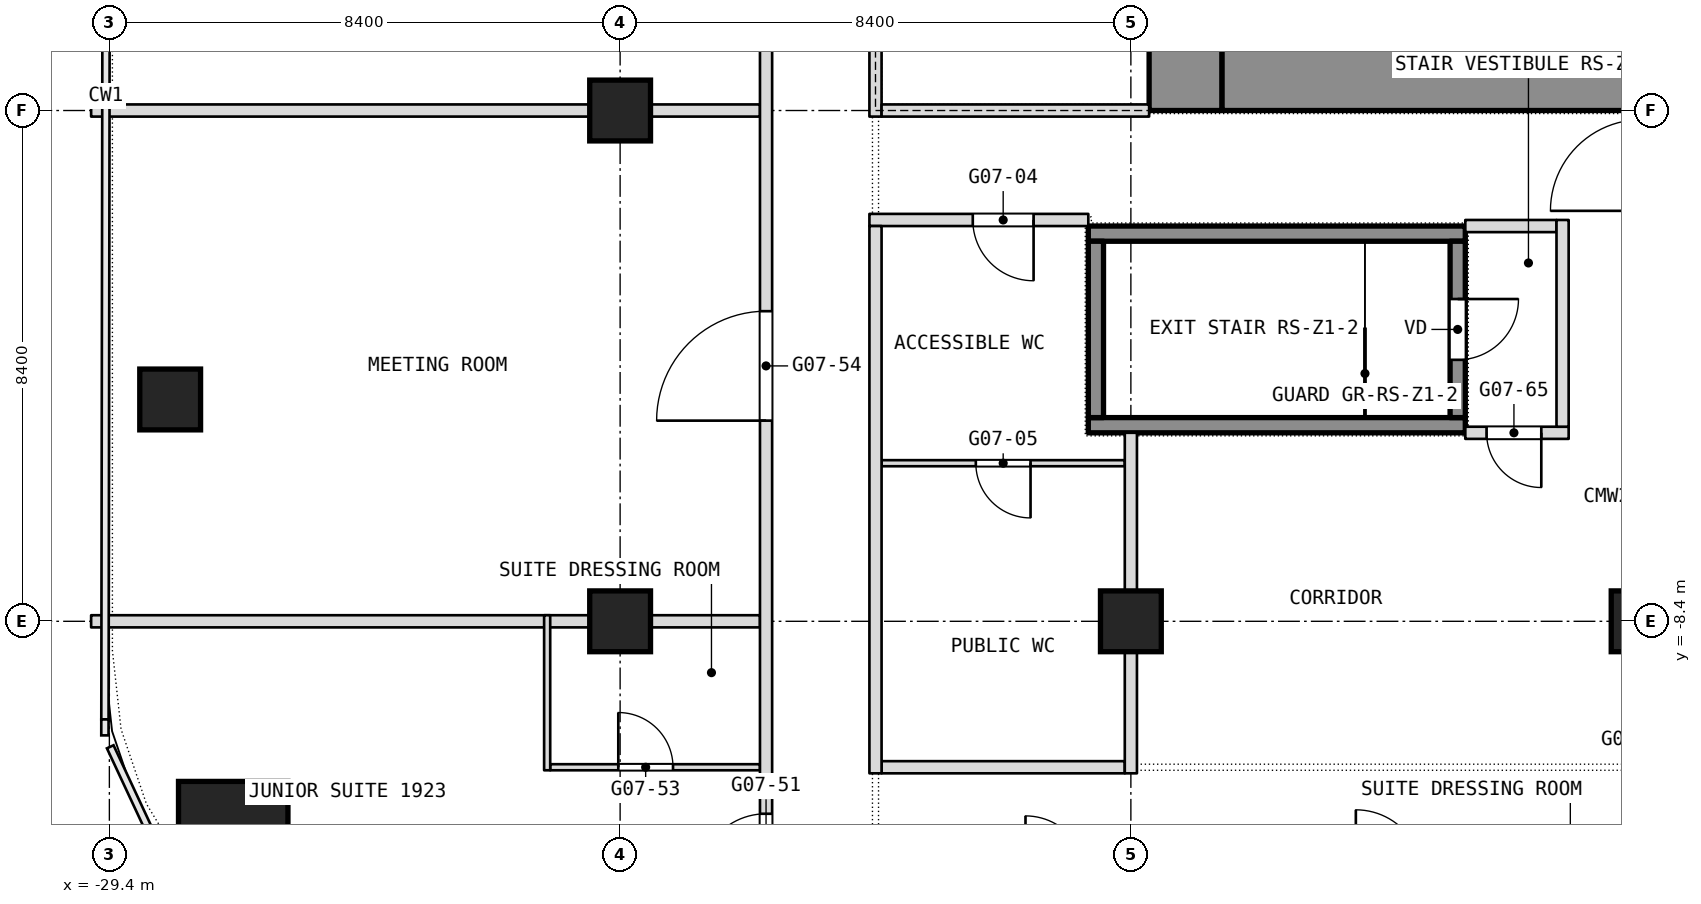
"""IFC4 building model, lengths in metres.
Left out: names, types, materials, properties, quantities, classifications, styles, units other than length and angle.
Written with IfcOpenShell. Run it as: python <this file> out.ifc"""

import sys

from ifc_helpers import new_model, si_unit, direction, frame, frame_2d, origin, origin_2d, place, context, subcontext, project, spatial, rectangle, extrude, element, fill, save


model = new_model("IFC4")
c1 = context("Model", 3, precision=1e-05, world=origin(), true_north=direction((0.0, 1.0)))
c2 = subcontext(c1, "Body", "Model", "MODEL_VIEW")
j1 = project(units=[si_unit("LENGTHUNIT", "METRE"), si_unit("PLANEANGLEUNIT", "RADIAN")], contexts=[c1])
p1 = place(None, origin())
s1 = spatial("IfcSite", under=j1, at=p1, CompositionType="ELEMENT")
p2 = place(p1, origin())
s2 = spatial("IfcBuilding", under=s1, at=p2, CompositionType="ELEMENT")
p3 = place(p2, frame((0.0, 0.0, 83.3)))
s3 = spatial("IfcBuildingStorey", under=s2, at=p3, CompositionType="ELEMENT", Elevation=83.3)
p4 = place(p3, frame((-11.7, 0.0, 0.0), z_axis=(0.0, 0.0, 1.0), x_axis=(0.0, 1.0, 0.0)))
e1 = element("IfcWall", 1, at=p4, inside=s3, PredefinedType="SHEAR", context=c2, shape_type="SweptSolid", body=[
    extrude(rectangle(XDim=16.8, YDim=1.2, at=frame_2d((8.4, 0.0))), origin(), (0.0, 0.0, 1.0), 3.6),
])
p5 = place(p4, frame((2.3, 0.0, 0.0)))
e2 = element("IfcOpeningElement", 2, at=p5, cuts=e1, PredefinedType="OPENING", context=c2, shape_type="SweptSolid", body=[
    extrude(rectangle(XDim=1.1, YDim=2.1, at=frame_2d((0.55, 1.05))), frame((0.0, 0.6, 0.0), z_axis=(0.0, -1.0, 0.0), x_axis=(1.0, 0.0, 0.0)), (0.0, 0.0, 1.0), 1.2),
])
p6 = place(p4, frame((4.85, 0.0, 0.0)))
e3 = element("IfcOpeningElement", 3, at=p6, cuts=e1, PredefinedType="OPENING", context=c2, shape_type="SweptSolid", body=[
    extrude(rectangle(XDim=1.1, YDim=2.1, at=frame_2d((0.55, 1.05))), frame((0.0, 0.6, 0.0), z_axis=(0.0, -1.0, 0.0), x_axis=(1.0, 0.0, 0.0)), (0.0, 0.0, 1.0), 1.2),
])
p7 = place(p4, frame((6.825, 0.0, 0.0)))
e4 = element("IfcOpeningElement", 4, at=p7, cuts=e1, PredefinedType="OPENING", context=c2, shape_type="SweptSolid", body=[
    extrude(rectangle(XDim=1.2, YDim=2.1, at=frame_2d((0.6, 1.05))), frame((0.0, 0.6, 0.0), z_axis=(0.0, -1.0, 0.0), x_axis=(1.0, 0.0, 0.0)), (0.0, 0.0, 1.0), 1.2),
])
p8 = place(p4, frame((13.4, 0.0, 0.0)))
e5 = element("IfcOpeningElement", 5, at=p8, cuts=e1, PredefinedType="OPENING", context=c2, shape_type="SweptSolid", body=[
    extrude(rectangle(XDim=1.1, YDim=2.1, at=frame_2d((0.55, 1.05))), frame((0.0, 0.6, 0.0), z_axis=(0.0, -1.0, 0.0), x_axis=(1.0, 0.0, 0.0)), (0.0, 0.0, 1.0), 1.2),
])
p9 = place(p4, frame((10.85, 0.0, 0.0)))
e6 = element("IfcOpeningElement", 6, at=p9, cuts=e1, PredefinedType="OPENING", context=c2, shape_type="SweptSolid", body=[
    extrude(rectangle(XDim=1.1, YDim=2.1, at=frame_2d((0.55, 1.05))), frame((0.0, 0.6, 0.0), z_axis=(0.0, -1.0, 0.0), x_axis=(1.0, 0.0, 0.0)), (0.0, 0.0, 1.0), 1.2),
])
p10 = place(p4, frame((8.775, 0.0, 0.0)))
e7 = element("IfcOpeningElement", 7, at=p10, cuts=e1, PredefinedType="OPENING", context=c2, shape_type="SweptSolid", body=[
    extrude(rectangle(XDim=1.2, YDim=2.1, at=frame_2d((0.6, 1.05))), frame((0.0, 0.6, 0.0), z_axis=(0.0, -1.0, 0.0), x_axis=(1.0, 0.0, 0.0)), (0.0, 0.0, 1.0), 1.2),
])
p11 = place(p3, frame((-11.1, 0.6, 0.0), z_axis=(0.0, 0.0, 1.0), x_axis=(1.0, 0.0, 0.0)))
e8 = element("IfcWall", 8, at=p11, inside=s3, PredefinedType="SHEAR", context=c2, shape_type="SweptSolid", body=[
    extrude(rectangle(XDim=22.2, YDim=1.2, at=frame_2d((11.1, 0.0))), origin(), (0.0, 0.0, 1.0), 3.6),
])
p12 = place(p3, frame((-27.363, -11.933, 0.0), z_axis=(0.0, 0.0, 1.0), x_axis=(1.0, 0.0, 0.0)))
e9 = element("IfcColumn", 9, at=p12, inside=s3, PredefinedType="COLUMN", context=c2, shape_type="SweptSolid", body=[
    extrude(rectangle(XDim=1.8, YDim=1.8, at=origin_2d()), origin(), (0.0, 0.0, 1.0), 3.6),
])
for number, where, z_axis, x_axis in (
    (10, (-21.0, -8.4, 0.0), (0.0, 0.0, 1.0), (1.0, 0.0, 0.0)),
    (11, (-21.0, 0.0, 0.0), (0.0, 0.0, 1.0), (1.0, 0.0, 0.0)),
    (12, (-12.6, -8.4, 0.0), (0.0, 0.0, 1.0), (1.0, 0.0, 0.0)),
    (13, (-4.2, -8.4, 0.0), (0.0, 0.0, 1.0), (1.0, 0.0, 0.0)),
    (14, (-28.4, -4.752, 0.0), (0.0, 0.0, 1.0), (1.0, 0.0, 0.0)),
):
    element("IfcColumn", number, at=place(p3, frame(where, z_axis=z_axis, x_axis=x_axis)), inside=s3, PredefinedType="COLUMN", context=c2, shape_type="SweptSolid", body=[
        extrude(rectangle(XDim=1.0, YDim=1.0, at=origin_2d()), origin(), (0.0, 0.0, 1.0), 3.6),
    ])
p13 = place(p3, frame((-22.15, -10.8, 0.0), z_axis=(0.0, 0.0, 1.0), x_axis=(1.0, 0.0, 0.0)))
e15 = element("IfcWall", 15, at=p13, inside=s3, PredefinedType="PARTITIONING", context=c2, shape_type="SweptSolid", body=[
    extrude(rectangle(XDim=3.45, YDim=0.1, at=frame_2d((1.725, 0.0))), origin(), (0.0, 0.0, 1.0), 3.3),
])
p14 = place(p13, frame((1.12, 0.0, 0.0)))
e16 = element("IfcOpeningElement", 16, at=p14, cuts=e15, PredefinedType="OPENING", context=c2, shape_type="SweptSolid", body=[
    extrude(rectangle(XDim=0.9, YDim=2.1, at=frame_2d((0.45, 1.05))), frame((0.0, 0.05, 0.0), z_axis=(0.0, -1.0, 0.0), x_axis=(1.0, 0.0, 0.0)), (0.0, 0.0, 1.0), 0.1),
])
p15 = place(p3, frame((-16.7, -10.8, 0.0), z_axis=(0.0, 0.0, 1.0), x_axis=(1.0, 0.0, 0.0)))
e17 = element("IfcWall", 17, at=p15, inside=s3, PredefinedType="PARTITIONING", context=c2, shape_type="SweptSolid", body=[
    extrude(rectangle(XDim=4.0, YDim=0.2, at=frame_2d((2.0, 0.0))), origin(), (0.0, 0.0, 1.0), 3.3),
])
p16 = place(p3, frame((-29.7, -8.4, 0.0), z_axis=(0.0, 0.0, 1.0), x_axis=(1.0, 0.0, 0.0)))
e18 = element("IfcWall", 18, at=p16, inside=s3, PredefinedType="PARTITIONING", context=c2, shape_type="SweptSolid", body=[
    extrude(rectangle(XDim=11.0, YDim=0.2, at=frame_2d((5.5, 0.0))), origin(), (0.0, 0.0, 1.0), 2.8),
])
p17 = place(p3, frame((-16.7, -5.8, 0.0), z_axis=(0.0, 0.0, 1.0), x_axis=(1.0, 0.0, 0.0)))
e19 = element("IfcWall", 19, at=p17, inside=s3, PredefinedType="PARTITIONING", context=c2, shape_type="SweptSolid", body=[
    extrude(rectangle(XDim=4.0, YDim=0.1, at=frame_2d((2.0, 0.0))), origin(), (0.0, 0.0, 1.0), 3.3),
])
p18 = place(p17, frame((1.55, 0.0, 0.0)))
e20 = element("IfcOpeningElement", 20, at=p18, cuts=e19, PredefinedType="OPENING", context=c2, shape_type="SweptSolid", body=[
    extrude(rectangle(XDim=0.9, YDim=2.1, at=frame_2d((0.45, 1.05))), frame((0.0, 0.05, 0.0), z_axis=(0.0, -1.0, 0.0), x_axis=(1.0, 0.0, 0.0)), (0.0, 0.0, 1.0), 0.1),
])
p19 = place(p3, frame((-7.1, -5.3, 0.0), z_axis=(0.0, 0.0, 1.0), x_axis=(1.0, 0.0, 0.0)))
e21 = element("IfcWall", 21, at=p19, inside=s3, PredefinedType="PARTITIONING", context=c2, shape_type="SweptSolid", body=[
    extrude(rectangle(XDim=1.7, YDim=0.2, at=frame_2d((0.85, 0.0))), origin(), (0.0, 0.0, 1.0), 3.3),
])
p20 = place(p19, frame((0.35, 0.0, 0.0)))
e22 = element("IfcOpeningElement", 22, at=p20, cuts=e21, PredefinedType="OPENING", context=c2, shape_type="SweptSolid", body=[
    extrude(rectangle(XDim=0.9, YDim=2.1, at=frame_2d((0.45, 1.05))), frame((0.0, 0.1, 0.0), z_axis=(0.0, -1.0, 0.0), x_axis=(1.0, 0.0, 0.0)), (0.0, 0.0, 1.0), 0.2),
])
p21 = place(p3, frame((-7.1, -1.9, 0.0), z_axis=(0.0, 0.0, 1.0), x_axis=(1.0, 0.0, 0.0)))
e23 = element("IfcWall", 23, at=p21, inside=s3, PredefinedType="PARTITIONING", context=c2, shape_type="SweptSolid", body=[
    extrude(rectangle(XDim=1.5, YDim=0.2, at=frame_2d((0.75, 0.0))), origin(), (0.0, 0.0, 1.0), 3.3),
])
p22 = place(p3, frame((-16.9, -1.8, 0.0), z_axis=(0.0, 0.0, 1.0), x_axis=(1.0, 0.0, 0.0)))
e24 = element("IfcWall", 24, at=p22, inside=s3, PredefinedType="PARTITIONING", context=c2, shape_type="SweptSolid", body=[
    extrude(rectangle(XDim=3.6, YDim=0.2, at=frame_2d((1.8, 0.0))), origin(), (0.0, 0.0, 1.0), 3.3),
])
p23 = place(p22, frame((1.7, 0.0, 0.0)))
e25 = element("IfcOpeningElement", 25, at=p23, cuts=e24, PredefinedType="OPENING", context=c2, shape_type="SweptSolid", body=[
    extrude(rectangle(XDim=1.0, YDim=2.1, at=frame_2d((0.5, 1.05))), frame((0.0, 0.1, 0.0), z_axis=(0.0, -1.0, 0.0), x_axis=(1.0, 0.0, 0.0)), (0.0, 0.0, 1.0), 0.2),
])
p24 = place(p3, frame((-29.7, 0.0, 0.0), z_axis=(0.0, 0.0, 1.0), x_axis=(1.0, 0.0, 0.0)))
e26 = element("IfcWall", 26, at=p24, inside=s3, PredefinedType="PARTITIONING", context=c2, shape_type="SweptSolid", body=[
    extrude(rectangle(XDim=11.0, YDim=0.2, at=frame_2d((5.5, 0.0))), origin(), (0.0, 0.0, 1.0), 2.8),
])
p25 = place(p3, frame((-5.5, -5.2, 0.0), z_axis=(0.0, 0.0, 1.0), x_axis=(0.0, 1.0, 0.0)))
e27 = element("IfcWall", 27, at=p25, inside=s3, PredefinedType="PARTITIONING", context=c2, shape_type="SweptSolid", body=[
    extrude(rectangle(XDim=3.4, YDim=0.2, at=frame_2d((1.7, 0.0))), origin(), (0.0, 0.0, 1.0), 3.3),
])
p26 = place(p3, frame((-12.6, -10.9, 0.0), z_axis=(0.0, 0.0, 1.0), x_axis=(0.0, 1.0, 0.0)))
e28 = element("IfcWall", 28, at=p26, inside=s3, PredefinedType="PARTITIONING", context=c2, shape_type="SweptSolid", body=[
    extrude(rectangle(XDim=5.6, YDim=0.2, at=frame_2d((2.8, 0.0))), origin(), (0.0, 0.0, 1.0), 2.486),
])
p27 = place(p3, frame((-16.8, -10.9, 0.0), z_axis=(0.0, 0.0, 1.0), x_axis=(0.0, 1.0, 0.0)))
e29 = element("IfcWall", 29, at=p27, inside=s3, PredefinedType="PARTITIONING", context=c2, shape_type="SweptSolid", body=[
    extrude(rectangle(XDim=9.0, YDim=0.2, at=frame_2d((4.5, 0.0))), origin(), (0.0, 0.0, 1.0), 3.3),
])
p28 = place(p3, frame((-18.6, -16.665, 0.0), z_axis=(0.0, 0.0, 1.0), x_axis=(0.0, 1.0, 0.0)))
e30 = element("IfcWall", 30, at=p28, inside=s3, PredefinedType="PARTITIONING", context=c2, shape_type="SweptSolid", body=[
    extrude(rectangle(XDim=23.565, YDim=0.2, at=frame_2d((11.782, 0.0))), origin(), (0.0, 0.0, 1.0), 3.3),
])
p29 = place(p28, frame((4.0, 0.0, 0.0)))
e31 = element("IfcOpeningElement", 31, at=p29, cuts=e30, PredefinedType="OPENING", context=c2, shape_type="SweptSolid", body=[
    extrude(rectangle(XDim=1.1, YDim=2.1, at=frame_2d((0.55, 1.05))), frame((0.0, 0.1, 0.0), z_axis=(0.0, -1.0, 0.0), x_axis=(1.0, 0.0, 0.0)), (0.0, 0.0, 1.0), 0.2),
])
p30 = place(p28, frame((11.565, 0.0, 0.0)))
e32 = element("IfcOpeningElement", 32, at=p30, cuts=e30, PredefinedType="OPENING", context=c2, shape_type="SweptSolid", body=[
    extrude(rectangle(XDim=1.8, YDim=2.1, at=frame_2d((0.9, 1.05))), frame((0.0, 0.1, 0.0), z_axis=(0.0, -1.0, 0.0), x_axis=(1.0, 0.0, 0.0)), (0.0, 0.0, 1.0), 0.2),
])
p31 = place(p28, frame((19.965, 0.0, 0.0)))
e33 = element("IfcOpeningElement", 33, at=p31, cuts=e30, PredefinedType="OPENING", context=c2, shape_type="SweptSolid", body=[
    extrude(rectangle(XDim=1.8, YDim=2.1, at=frame_2d((0.9, 1.05))), frame((0.0, 0.1, 0.0), z_axis=(0.0, -1.0, 0.0), x_axis=(1.0, 0.0, 0.0)), (0.0, 0.0, 1.0), 0.2),
])
p32 = place(p3, frame((-22.2, -10.85, 0.0), z_axis=(0.0, 0.0, 1.0), x_axis=(0.0, 1.0, 0.0)))
e34 = element("IfcWall", 34, at=p32, inside=s3, PredefinedType="PARTITIONING", context=c2, shape_type="SweptSolid", body=[
    extrude(rectangle(XDim=2.55, YDim=0.1, at=frame_2d((1.275, 0.0))), origin(), (0.0, 0.0, 1.0), 3.3),
])
p33 = place(p3, frame((-16.8, -0.1, 0.0), z_axis=(0.0, 0.0, 1.0), x_axis=(0.0, 1.0, 0.0)))
e35 = element("IfcWall", 35, at=p33, inside=s3, PredefinedType="PARTITIONING", context=c2, shape_type="SweptSolid", body=[
    extrude(rectangle(XDim=17.0, YDim=0.2, at=frame_2d((8.5, 0.0))), origin(), (0.0, 0.0, 1.0), 3.3),
])
p34 = place(p33, frame((2.2, 0.0, 0.0)))
e36 = element("IfcOpeningElement", 36, at=p34, cuts=e35, PredefinedType="OPENING", context=c2, shape_type="SweptSolid", body=[
    extrude(rectangle(XDim=1.8, YDim=2.1, at=frame_2d((0.9, 1.05))), frame((0.0, 0.1, 0.0), z_axis=(0.0, -1.0, 0.0), x_axis=(1.0, 0.0, 0.0)), (0.0, 0.0, 1.0), 0.2),
])
p35 = place(p33, frame((7.2, 0.0, 0.0)))
e37 = element("IfcOpeningElement", 37, at=p35, cuts=e35, PredefinedType="OPENING", context=c2, shape_type="SweptSolid", body=[
    extrude(rectangle(XDim=1.8, YDim=2.1, at=frame_2d((0.9, 1.05))), frame((0.0, 0.1, 0.0), z_axis=(0.0, -1.0, 0.0), x_axis=(1.0, 0.0, 0.0)), (0.0, 0.0, 1.0), 0.2),
])
p36 = place(p3, frame((-16.7, 0.0, 0.0), z_axis=(0.0, 0.0, 1.0), x_axis=(1.0, 0.0, 0.0)))
e38 = element("IfcWall", 38, at=p36, inside=s3, PredefinedType="PARTITIONING", context=c2, shape_type="SweptSolid", body=[
    extrude(rectangle(XDim=4.4, YDim=0.2, at=frame_2d((2.2, 0.0))), origin(), (0.0, 0.0, 1.0), 2.8),
])
for number, where, z_axis, x_axis in (
    (39, (-13.3, -5.175, 0.1), (0.0, 0.0, 1.0), (1.0, 0.0, 0.0)),
    (40, (-13.3, -2.025, 0.1), (0.0, 0.0, 1.0), (1.0, 0.0, 0.0)),
):
    element("IfcWall", number, at=place(p3, frame(where, z_axis=z_axis, x_axis=x_axis)), inside=s3, PredefinedType="SHEAR", context=c2, shape_type="SweptSolid", body=[
        extrude(rectangle(XDim=6.2, YDim=0.25, at=frame_2d((3.1, 0.0))), origin(), (0.0, 0.0, 1.0), 3.2),
    ])
p37 = place(p3, frame((-13.175, -5.05, 0.1), z_axis=(0.0, 0.0, 1.0), x_axis=(0.0, 1.0, 0.0)))
e41 = element("IfcWall", 41, at=p37, inside=s3, PredefinedType="SHEAR", context=c2, shape_type="SweptSolid", body=[
    extrude(rectangle(XDim=2.9, YDim=0.25, at=frame_2d((1.45, 0.0))), origin(), (0.0, 0.0, 1.0), 3.2),
])
p38 = place(p3, frame((-7.225, -5.05, 0.1), z_axis=(0.0, 0.0, 1.0), x_axis=(0.0, 1.0, 0.0)))
e42 = element("IfcWall", 42, at=p38, inside=s3, PredefinedType="SHEAR", context=c2, shape_type="SweptSolid", body=[
    extrude(rectangle(XDim=2.9, YDim=0.25, at=frame_2d((1.45, 0.0))), origin(), (0.0, 0.0, 1.0), 3.2),
])
p39 = place(p38, frame((0.95, 0.0, 0.0)))
e43 = element("IfcOpeningElement", 43, at=p39, cuts=e42, PredefinedType="OPENING", context=c2, shape_type="SweptSolid", body=[
    extrude(rectangle(XDim=1.0, YDim=2.1, at=frame_2d((0.5, 1.05))), frame((0.0, 0.125, 0.0), z_axis=(0.0, -1.0, 0.0), x_axis=(1.0, 0.0, 0.0)), (0.0, 0.0, 1.0), 0.25),
])
p40 = place(p14, origin())
e44 = element("IfcDoor", 44, at=p40, inside=s3, OperationType="SINGLE_SWING_LEFT", PredefinedType="DOOR", context=c2, shape_type="SweptSolid", body=[
    extrude(rectangle(XDim=0.9, YDim=2.1, at=frame_2d((0.45, 1.05))), frame((0.0, 0.025, 0.0), z_axis=(0.0, -1.0, 0.0), x_axis=(1.0, 0.0, 0.0)), (0.0, 0.0, 1.0), 0.05),
])
fill(e16, e44)
p41 = place(p18, origin())
e45 = element("IfcDoor", 45, at=p41, inside=s3, OperationType="SINGLE_SWING_LEFT", PredefinedType="DOOR", context=c2, shape_type="SweptSolid", body=[
    extrude(rectangle(XDim=0.9, YDim=2.1, at=frame_2d((0.45, 1.05))), frame((0.0, 0.025, 0.0), z_axis=(0.0, -1.0, 0.0), x_axis=(1.0, 0.0, 0.0)), (0.0, 0.0, 1.0), 0.05),
])
fill(e20, e45)
p42 = place(p20, origin())
e46 = element("IfcDoor", 46, at=p42, inside=s3, OperationType="SINGLE_SWING_RIGHT", PredefinedType="DOOR", context=c2, shape_type="SweptSolid", body=[
    extrude(rectangle(XDim=0.9, YDim=2.1, at=frame_2d((0.45, 1.05))), frame((0.0, 0.025, 0.0), z_axis=(0.0, -1.0, 0.0), x_axis=(1.0, 0.0, 0.0)), (0.0, 0.0, 1.0), 0.05),
])
fill(e22, e46)
p43 = place(p23, origin())
e47 = element("IfcDoor", 47, at=p43, inside=s3, OperationType="SINGLE_SWING_RIGHT", PredefinedType="DOOR", context=c2, shape_type="SweptSolid", body=[
    extrude(rectangle(XDim=1.0, YDim=2.1, at=frame_2d((0.5, 1.05))), frame((0.0, 0.025, 0.0), z_axis=(0.0, -1.0, 0.0), x_axis=(1.0, 0.0, 0.0)), (0.0, 0.0, 1.0), 0.05),
])
fill(e25, e47)
p44 = place(p29, origin())
e48 = element("IfcDoor", 48, at=p44, inside=s3, OperationType="SINGLE_SWING_LEFT", PredefinedType="DOOR", context=c2, shape_type="SweptSolid", body=[
    extrude(rectangle(XDim=1.1, YDim=2.1, at=frame_2d((0.55, 1.05))), frame((0.0, 0.025, 0.0), z_axis=(0.0, -1.0, 0.0), x_axis=(1.0, 0.0, 0.0)), (0.0, 0.0, 1.0), 0.05),
])
fill(e31, e48)
p45 = place(p30, origin())
e49 = element("IfcDoor", 49, at=p45, inside=s3, OperationType="DOUBLE_DOOR_SINGLE_SWING", PredefinedType="DOOR", context=c2, shape_type="SweptSolid", body=[
    extrude(rectangle(XDim=1.8, YDim=2.1, at=frame_2d((0.9, 1.05))), frame((0.0, 0.025, 0.0), z_axis=(0.0, -1.0, 0.0), x_axis=(1.0, 0.0, 0.0)), (0.0, 0.0, 1.0), 0.05),
])
fill(e32, e49)
p46 = place(p39, origin())
e50 = element("IfcDoor", 50, at=p46, inside=s3, OperationType="SINGLE_SWING_LEFT", PredefinedType="DOOR", context=c2, shape_type="SweptSolid", body=[
    extrude(rectangle(XDim=1.0, YDim=2.1, at=frame_2d((0.5, 1.05))), frame((0.0, 0.025, 0.0), z_axis=(0.0, -1.0, 0.0), x_axis=(1.0, 0.0, 0.0)), (0.0, 0.0, 1.0), 0.05),
])
fill(e43, e50)
save(model, sys.argv[1])
